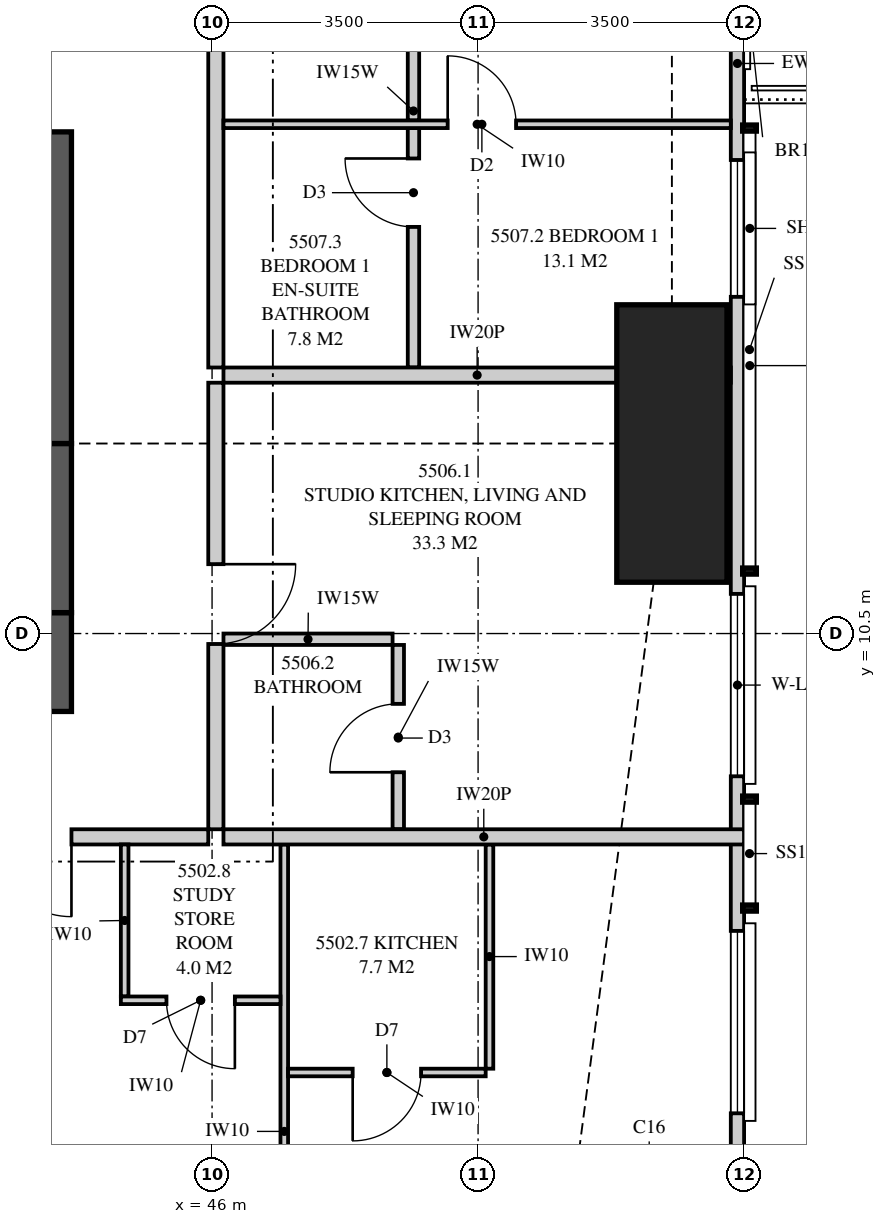
"""IFC4 building model, lengths in metres.
Left out: names, types, materials, properties, quantities, classifications, styles, units other than length and angle.
Written with IfcOpenShell. Run it as: python <this file> out.ifc"""

import sys

from ifc_helpers import new_model, si_unit, direction, frame, frame_2d, origin, origin_2d, place, context, subcontext, project, spatial, polyline, rectangle, outline, extrude, element, fill, save


model = new_model("IFC4")
c1 = context("Model", 3, precision=1e-05, world=origin(), true_north=direction((0.0, 1.0)))
c2 = subcontext(c1, "Body", "Model", "MODEL_VIEW")
j1 = project(units=[si_unit("LENGTHUNIT", "METRE"), si_unit("PLANEANGLEUNIT", "RADIAN")], contexts=[c1])
p1 = place(None, origin())
s1 = spatial("IfcSite", under=j1, at=p1, CompositionType="ELEMENT")
p2 = place(p1, origin())
s2 = spatial("IfcBuilding", under=s1, at=p2, CompositionType="ELEMENT")
p3 = place(p2, frame((0.0, 0.0, 201.25)))
s3 = spatial("IfcBuildingStorey", under=s2, at=p3, CompositionType="ELEMENT", Elevation=201.25)
p4 = place(p3, frame((52.05, 13.0, 0.0), z_axis=(0.0, 0.0, 1.0), x_axis=(1.0, 0.0, 0.0)))
e1 = element("IfcColumn", 1, at=p4, inside=s3, PredefinedType="COLUMN", context=c2, shape_type="SweptSolid", body=[
    extrude(rectangle(XDim=1.45, YDim=3.65, at=origin_2d()), origin(), (0.0, 0.0, 1.0), 3.35),
])
p5 = place(p3, frame((35.9, 10.125, 0.0), z_axis=(0.0, 0.0, 1.0), x_axis=(1.0, 0.0, 0.0)))
e2 = element("IfcWall", 2, at=p5, inside=s3, PredefinedType="SHEAR", context=c2, shape_type="SweptSolid", body=[
    extrude(rectangle(XDim=8.25, YDim=1.3, at=frame_2d((4.125, 0.0))), origin(), (0.0, 0.0, 1.0), 3.35),
])
p6 = place(p5, frame((2.7, 0.0, 0.0)))
e3 = element("IfcOpeningElement", 3, at=p6, cuts=e2, PredefinedType="OPENING", context=c2, shape_type="SweptSolid", body=[
    extrude(rectangle(XDim=1.0, YDim=2.1, at=frame_2d((0.5, 1.05))), frame((0.0, 0.66, 0.0), z_axis=(0.0, -1.0, 0.0), x_axis=(1.0, 0.0, 0.0)), (0.0, 0.0, 1.0), 1.32),
])
p7 = place(p3, frame((43.8, 10.775, 0.0), z_axis=(0.0, 0.0, 1.0), x_axis=(0.0, 1.0, 0.0)))
e4 = element("IfcWall", 4, at=p7, inside=s3, PredefinedType="SHEAR", context=c2, shape_type="SweptSolid", body=[
    extrude(rectangle(XDim=2.225, YDim=0.7, at=frame_2d((1.113, 0.0))), origin(), (0.0, 0.0, 1.0), 3.35),
])
p8 = place(p3, frame((43.8, 13.0, 0.0), z_axis=(0.0, 0.0, 1.0), x_axis=(0.0, 1.0, 0.0)))
e5 = element("IfcWall", 5, at=p8, inside=s3, PredefinedType="SHEAR", context=c2, shape_type="SweptSolid", body=[
    extrude(rectangle(XDim=6.3, YDim=0.7, at=frame_2d((3.15, 0.0))), origin(), (0.0, 0.0, 1.0), 3.35),
])
p9 = place(p8, frame((4.1, 0.0, 0.0)))
e6 = element("IfcOpeningElement", 6, at=p9, cuts=e5, PredefinedType="OPENING", context=c2, shape_type="SweptSolid", body=[
    extrude(rectangle(XDim=1.2, YDim=2.2, at=frame_2d((0.6, 1.1))), frame((0.0, 0.36, 0.0), z_axis=(0.0, -1.0, 0.0), x_axis=(1.0, 0.0, 0.0)), (0.0, 0.0, 1.0), 0.72),
])
p10 = place(p3, frame((52.913, 3.051, 0.0), z_axis=(0.0, 0.0, 1.0), x_axis=(0.0, 1.0, 0.0)))
e7 = element("IfcWall", 7, at=p10, inside=s3, PredefinedType="SOLIDWALL", context=c2, shape_type="SweptSolid", body=[
    extrude(outline(polyline([(0.0, 0.0), (29.897, 0.0), (29.897, 3.11), (22.167, 3.11), (22.167, 2.15), (22.074, 2.15), (22.074, 3.11), (21.949, 3.11), (21.949, 2.15), (9.949, 2.15), (9.949, 3.11), (9.847, 3.11), (9.847, 2.15), (9.706, 2.15), (9.706, 3.11), (0.0, 3.11), (0.0, 0.0)])), frame((0.0, 0.087, 0.0), z_axis=(0.0, -1.0, 0.0), x_axis=(1.0, 0.0, 0.0)), (0.0, 0.0, 1.0), 0.175),
])
p11 = place(p10, frame((1.137, 0.0, 0.4)))
e8 = element("IfcOpeningElement", 8, at=p11, cuts=e7, PredefinedType="OPENING", context=c2, shape_type="SweptSolid", body=[
    extrude(rectangle(XDim=2.4, YDim=1.7, at=frame_2d((1.2, 0.85))), frame((0.0, 0.097, 0.0), z_axis=(0.0, -1.0, 0.0), x_axis=(1.0, 0.0, 0.0)), (0.0, 0.0, 1.0), 0.195),
])
p12 = place(p10, frame((5.571, 0.0, 0.4)))
e9 = element("IfcOpeningElement", 9, at=p12, cuts=e7, PredefinedType="OPENING", context=c2, shape_type="SweptSolid", body=[
    extrude(rectangle(XDim=2.4, YDim=1.7, at=frame_2d((1.2, 0.85))), frame((0.0, 0.097, 0.0), z_axis=(0.0, -1.0, 0.0), x_axis=(1.0, 0.0, 0.0)), (0.0, 0.0, 1.0), 0.195),
])
p13 = place(p10, frame((11.879, 0.0, 0.4)))
e10 = element("IfcOpeningElement", 10, at=p13, cuts=e7, PredefinedType="OPENING", context=c2, shape_type="SweptSolid", body=[
    extrude(rectangle(XDim=1.8, YDim=1.7, at=frame_2d((0.9, 0.85))), frame((0.0, 0.097, 0.0), z_axis=(0.0, -1.0, 0.0), x_axis=(1.0, 0.0, 0.0)), (0.0, 0.0, 1.0), 0.195),
])
p14 = place(p10, frame((15.324, 0.0, 0.0)))
e11 = element("IfcOpeningElement", 11, at=p14, cuts=e7, PredefinedType="OPENING", context=c2, shape_type="SweptSolid", body=[
    extrude(rectangle(XDim=1.8, YDim=2.1, at=frame_2d((0.9, 1.05))), frame((0.0, 0.097, 0.0), z_axis=(0.0, -1.0, 0.0), x_axis=(1.0, 0.0, 0.0)), (0.0, 0.0, 1.0), 0.195),
])
p15 = place(p10, frame((18.224, 0.0, 0.4)))
e12 = element("IfcOpeningElement", 12, at=p15, cuts=e7, PredefinedType="OPENING", context=c2, shape_type="SweptSolid", body=[
    extrude(rectangle(XDim=1.8, YDim=1.7, at=frame_2d((0.9, 0.85))), frame((0.0, 0.097, 0.0), z_axis=(0.0, -1.0, 0.0), x_axis=(1.0, 0.0, 0.0)), (0.0, 0.0, 1.0), 0.195),
])
p16 = place(p10, frame((27.461, 0.0, 0.4)))
e13 = element("IfcOpeningElement", 13, at=p16, cuts=e7, PredefinedType="OPENING", context=c2, shape_type="SweptSolid", body=[
    extrude(rectangle(XDim=1.2, YDim=1.7, at=frame_2d((0.6, 0.85))), frame((0.0, 0.097, 0.0), z_axis=(0.0, -1.0, 0.0), x_axis=(1.0, 0.0, 0.0)), (0.0, 0.0, 1.0), 0.195),
])
p17 = place(p3, frame((34.3, 7.825, 0.0), z_axis=(0.0, 0.0, 1.0), x_axis=(1.0, 0.0, 0.0)))
e14 = element("IfcWall", 14, at=p17, inside=s3, PredefinedType="PARTITIONING", context=c2, shape_type="SweptSolid", body=[
    extrude(outline(polyline([(0.0, 0.0), (11.65, 0.0), (11.65, 3.11), (8.787, 3.11), (8.787, 2.541), (8.113, 2.541), (8.113, 3.11), (0.0, 3.11), (0.0, 0.0)])), frame((0.0, 0.1, 0.0), z_axis=(0.0, -1.0, 0.0), x_axis=(1.0, 0.0, 0.0)), (0.0, 0.0, 1.0), 0.2),
])
p18 = place(p17, frame((8.8, 0.0, 0.0)))
e15 = element("IfcOpeningElement", 15, at=p18, cuts=e14, PredefinedType="OPENING", context=c2, shape_type="SweptSolid", body=[
    extrude(rectangle(XDim=1.05, YDim=2.2, at=frame_2d((0.525, 1.1))), frame((0.0, 0.11, 0.0), z_axis=(0.0, -1.0, 0.0), x_axis=(1.0, 0.0, 0.0)), (0.0, 0.0, 1.0), 0.22),
])
p19 = place(p3, frame((46.95, 0.175, 0.0), z_axis=(0.0, 0.0, 1.0), x_axis=(0.0, 1.0, 0.0)))
e16 = element("IfcWall", 16, at=p19, inside=s3, PredefinedType="PARTITIONING", context=c2, shape_type="SweptSolid", body=[
    extrude(outline(polyline([(0.0, 0.0), (7.55, 0.0), (7.55, 3.11), (2.392, 3.11), (2.392, 2.15), (0.645, 2.15), (0.645, 3.11), (0.0, 3.11), (0.0, 0.0)])), frame((0.0, 0.05, 0.0), z_axis=(0.0, -1.0, 0.0), x_axis=(1.0, 0.0, 0.0)), (0.0, 0.0, 1.0), 0.1),
])
p20 = place(p19, frame((1.8, 0.0, 0.0)))
e17 = element("IfcOpeningElement", 17, at=p20, cuts=e16, PredefinedType="OPENING", context=c2, shape_type="SweptSolid", body=[
    extrude(rectangle(XDim=0.9, YDim=2.1, at=frame_2d((0.45, 1.05))), frame((0.0, 0.06, 0.0), z_axis=(0.0, -1.0, 0.0), x_axis=(1.0, 0.0, 0.0)), (0.0, 0.0, 1.0), 0.12),
])
p21 = place(p3, frame((47.0, 4.725, 0.0), z_axis=(0.0, 0.0, 1.0), x_axis=(1.0, 0.0, 0.0)))
e18 = element("IfcWall", 18, at=p21, inside=s3, PredefinedType="PARTITIONING", context=c2, shape_type="SweptSolid", body=[
    extrude(rectangle(XDim=2.6, YDim=0.1, at=frame_2d((1.3, 0.0))), origin(), (0.0, 0.0, 1.0), 3.11),
])
p22 = place(p21, frame((0.85, 0.0, 0.0)))
e19 = element("IfcOpeningElement", 19, at=p22, cuts=e18, PredefinedType="OPENING", context=c2, shape_type="SweptSolid", body=[
    extrude(rectangle(XDim=0.9, YDim=2.1, at=frame_2d((0.45, 1.05))), frame((0.0, 0.06, 0.0), z_axis=(0.0, -1.0, 0.0), x_axis=(1.0, 0.0, 0.0)), (0.0, 0.0, 1.0), 0.12),
])
p23 = place(p3, frame((49.65, 4.775, 0.0), z_axis=(0.0, 0.0, 1.0), x_axis=(0.0, 1.0, 0.0)))
e20 = element("IfcWall", 20, at=p23, inside=s3, PredefinedType="PARTITIONING", context=c2, shape_type="SweptSolid", body=[
    extrude(rectangle(XDim=2.95, YDim=0.1, at=frame_2d((1.475, 0.0))), origin(), (0.0, 0.0, 1.0), 3.11),
])
p24 = place(p3, frame((46.15, 7.825, 0.0), z_axis=(0.0, 0.0, 1.0), x_axis=(1.0, 0.0, 0.0)))
e21 = element("IfcWall", 21, at=p24, inside=s3, PredefinedType="PARTITIONING", context=c2, shape_type="SweptSolid", body=[
    extrude(outline(polyline([(0.0, 0.0), (6.85, 0.0), (6.85, 3.11), (6.138, 3.11), (6.138, 2.15), (4.303, 2.15), (4.303, 3.11), (0.0, 3.11), (0.0, 0.0)])), frame((0.0, 0.1, 0.0), z_axis=(0.0, -1.0, 0.0), x_axis=(1.0, 0.0, 0.0)), (0.0, 0.0, 1.0), 0.2),
])
p25 = place(p3, frame((52.825, 13.9, 0.0), z_axis=(0.0, 0.0, 1.0), x_axis=(-1.0, 0.0, 0.0)))
e22 = element("IfcWall", 22, at=p25, inside=s3, PredefinedType="PARTITIONING", context=c2, shape_type="SweptSolid", body=[
    extrude(outline(polyline([(0.529, 2.15), (0.0, 2.15), (0.0, 0.0), (0.529, 0.0), (0.529, 0.636), (1.021, 0.636), (1.021, 0.0), (6.675, 0.0), (6.675, 3.11), (1.685, 3.11), (1.685, 2.15), (1.021, 2.15), (1.021, 1.514), (0.529, 1.514), (0.529, 2.15)])), frame((0.0, 0.1, 0.0), z_axis=(0.0, -1.0, 0.0), x_axis=(1.0, 0.0, 0.0)), (0.0, 0.0, 1.0), 0.2),
])
p26 = place(p3, frame((46.05, 7.925, 0.0), z_axis=(0.0, 0.0, 1.0), x_axis=(0.0, 1.0, 0.0)))
e23 = element("IfcWall", 23, at=p26, inside=s3, PredefinedType="PARTITIONING", context=c2, shape_type="SweptSolid", body=[
    extrude(outline(polyline([(0.0, 0.0), (5.875, 0.0), (5.875, 3.11), (5.412, 3.11), (5.412, 2.541), (4.738, 2.541), (4.738, 3.11), (0.0, 3.11), (0.0, 0.0)])), frame((0.0, 0.1, 0.0), z_axis=(0.0, -1.0, 0.0), x_axis=(1.0, 0.0, 0.0)), (0.0, 0.0, 1.0), 0.2),
])
p27 = place(p26, frame((2.438, 0.0, 0.0)))
e24 = element("IfcOpeningElement", 24, at=p27, cuts=e23, PredefinedType="OPENING", context=c2, shape_type="SweptSolid", body=[
    extrude(rectangle(XDim=1.05, YDim=2.2, at=frame_2d((0.525, 1.1))), frame((0.0, 0.11, 0.0), z_axis=(0.0, -1.0, 0.0), x_axis=(1.0, 0.0, 0.0)), (0.0, 0.0, 1.0), 0.22),
])
p28 = place(p3, frame((48.45, 7.925, 0.0), z_axis=(0.0, 0.0, 1.0), x_axis=(0.0, 1.0, 0.0)))
e25 = element("IfcWall", 25, at=p28, inside=s3, PredefinedType="PLUMBINGWALL", context=c2, shape_type="SweptSolid", body=[
    extrude(rectangle(XDim=2.425, YDim=0.15, at=frame_2d((1.212, 0.0))), origin(), (0.0, 0.0, 1.0), 3.11),
])
p29 = place(p28, frame((0.75, 0.0, 0.0)))
e26 = element("IfcOpeningElement", 26, at=p29, cuts=e25, PredefinedType="OPENING", context=c2, shape_type="SweptSolid", body=[
    extrude(rectangle(XDim=0.9, YDim=2.1, at=frame_2d((0.45, 1.05))), frame((0.0, 0.085, 0.0), z_axis=(0.0, -1.0, 0.0), x_axis=(1.0, 0.0, 0.0)), (0.0, 0.0, 1.0), 0.17),
])
p30 = place(p3, frame((48.375, 10.425, 0.0), z_axis=(0.0, 0.0, 1.0), x_axis=(-1.0, 0.0, 0.0)))
e27 = element("IfcWall", 27, at=p30, inside=s3, PredefinedType="PLUMBINGWALL", context=c2, shape_type="SweptSolid", body=[
    extrude(rectangle(XDim=2.225, YDim=0.15, at=frame_2d((1.113, 0.0))), origin(), (0.0, 0.0, 1.0), 3.11),
])
p31 = place(p3, frame((46.05, 14.0, 0.0), z_axis=(0.0, 0.0, 1.0), x_axis=(0.0, 1.0, 0.0)))
e28 = element("IfcWall", 28, at=p31, inside=s3, PredefinedType="PARTITIONING", context=c2, shape_type="SweptSolid", body=[
    extrude(rectangle(XDim=6.9, YDim=0.2, at=frame_2d((3.45, 0.0))), origin(), (0.0, 0.0, 1.0), 3.11),
])
p32 = place(p3, frame((52.825, 17.2, 0.0), z_axis=(0.0, 0.0, 1.0), x_axis=(-1.0, 0.0, 0.0)))
e29 = element("IfcWall", 29, at=p32, inside=s3, PredefinedType="PARTITIONING", context=c2, shape_type="SweptSolid", body=[
    extrude(outline(polyline([(0.0, 0.0), (6.675, 0.0), (6.675, 3.11), (1.635, 3.11), (1.635, 2.15), (0.0, 2.15), (0.0, 3.11), (0.0, 0.0)])), frame((0.0, 0.05, 0.0), z_axis=(0.0, -1.0, 0.0), x_axis=(1.0, 0.0, 0.0)), (0.0, 0.0, 1.0), 0.1),
])
p33 = place(p32, frame((2.825, 0.0, 0.0)))
e30 = element("IfcOpeningElement", 30, at=p33, cuts=e29, PredefinedType="OPENING", context=c2, shape_type="SweptSolid", body=[
    extrude(rectangle(XDim=0.9, YDim=2.1, at=frame_2d((0.45, 1.05))), frame((0.0, 0.06, 0.0), z_axis=(0.0, -1.0, 0.0), x_axis=(1.0, 0.0, 0.0)), (0.0, 0.0, 1.0), 0.12),
])
p34 = place(p3, frame((48.65, 14.0, 0.0), z_axis=(0.0, 0.0, 1.0), x_axis=(0.0, 1.0, 0.0)))
e31 = element("IfcWall", 31, at=p34, inside=s3, PredefinedType="PLUMBINGWALL", context=c2, shape_type="SweptSolid", body=[
    extrude(rectangle(XDim=3.15, YDim=0.15, at=frame_2d((1.575, 0.0))), origin(), (0.0, 0.0, 1.0), 3.11),
])
p35 = place(p34, frame((1.85, 0.0, 0.0)))
e32 = element("IfcOpeningElement", 32, at=p35, cuts=e31, PredefinedType="OPENING", context=c2, shape_type="SweptSolid", body=[
    extrude(rectangle(XDim=0.9, YDim=2.1, at=frame_2d((0.45, 1.05))), frame((0.0, 0.085, 0.0), z_axis=(0.0, -1.0, 0.0), x_axis=(1.0, 0.0, 0.0)), (0.0, 0.0, 1.0), 0.17),
])
p36 = place(p3, frame((48.65, 17.25, 0.0), z_axis=(0.0, 0.0, 1.0), x_axis=(0.0, 1.0, 0.0)))
e33 = element("IfcWall", 33, at=p36, inside=s3, PredefinedType="PLUMBINGWALL", context=c2, shape_type="SweptSolid", body=[
    extrude(rectangle(XDim=3.5, YDim=0.15, at=frame_2d((1.75, 0.0))), origin(), (0.0, 0.0, 1.0), 3.11),
])
p37 = place(p3, frame((46.9, 5.675, 0.0), z_axis=(0.0, 0.0, 1.0), x_axis=(-1.0, 0.0, 0.0)))
e34 = element("IfcWall", 34, at=p37, inside=s3, PredefinedType="PARTITIONING", context=c2, shape_type="SweptSolid", body=[
    extrude(rectangle(XDim=2.1, YDim=0.1, at=frame_2d((1.05, 0.0))), origin(), (0.0, 0.0, 1.0), 3.11),
])
p38 = place(p37, frame((0.6, 0.0, 0.0)))
e35 = element("IfcOpeningElement", 35, at=p38, cuts=e34, PredefinedType="OPENING", context=c2, shape_type="SweptSolid", body=[
    extrude(rectangle(XDim=0.9, YDim=2.1, at=frame_2d((0.45, 1.05))), frame((0.0, 0.06, 0.0), z_axis=(0.0, -1.0, 0.0), x_axis=(1.0, 0.0, 0.0)), (0.0, 0.0, 1.0), 0.12),
])
p39 = place(p3, frame((44.85, 7.725, 0.0), z_axis=(0.0, 0.0, 1.0), x_axis=(0.0, -1.0, 0.0)))
e36 = element("IfcWall", 36, at=p39, inside=s3, PredefinedType="PARTITIONING", context=c2, shape_type="SweptSolid", body=[
    extrude(rectangle(XDim=2.0, YDim=0.1, at=frame_2d((1.0, 0.0))), origin(), (0.0, 0.0, 1.0), 3.11),
])
p40 = place(p11, origin())
e37 = element("IfcWindow", 37, at=p40, inside=s3, PartitioningType="SINGLE_PANEL", PredefinedType="WINDOW", context=c2, shape_type="SweptSolid", body=[
    extrude(rectangle(XDim=2.4, YDim=1.7, at=frame_2d((1.2, 0.85))), frame((0.0, 0.03, 0.0), z_axis=(0.0, -1.0, 0.0), x_axis=(1.0, 0.0, 0.0)), (0.0, 0.0, 1.0), 0.06),
])
fill(e8, e37)
p41 = place(p12, origin())
e38 = element("IfcWindow", 38, at=p41, inside=s3, PartitioningType="SINGLE_PANEL", PredefinedType="WINDOW", context=c2, shape_type="SweptSolid", body=[
    extrude(rectangle(XDim=2.4, YDim=1.7, at=frame_2d((1.2, 0.85))), frame((0.0, 0.03, 0.0), z_axis=(0.0, -1.0, 0.0), x_axis=(1.0, 0.0, 0.0)), (0.0, 0.0, 1.0), 0.06),
])
fill(e9, e38)
p42 = place(p13, origin())
e39 = element("IfcWindow", 39, at=p42, inside=s3, PartitioningType="SINGLE_PANEL", PredefinedType="WINDOW", context=c2, shape_type="SweptSolid", body=[
    extrude(rectangle(XDim=1.8, YDim=1.7, at=frame_2d((0.9, 0.85))), frame((0.0, 0.03, 0.0), z_axis=(0.0, -1.0, 0.0), x_axis=(1.0, 0.0, 0.0)), (0.0, 0.0, 1.0), 0.06),
])
fill(e10, e39)
p43 = place(p18, frame((1.05, 0.0, 0.0), z_axis=(0.0, 0.0, 1.0), x_axis=(-1.0, 0.0, 0.0)))
e40 = element("IfcDoor", 40, at=p43, inside=s3, OperationType="SINGLE_SWING_LEFT", PredefinedType="DOOR", context=c2, shape_type="SweptSolid", body=[
    extrude(rectangle(XDim=1.05, YDim=2.2, at=frame_2d((0.525, 1.1))), frame((0.0, 0.025, 0.0), z_axis=(0.0, -1.0, 0.0), x_axis=(1.0, 0.0, 0.0)), (0.0, 0.0, 1.0), 0.05),
])
fill(e15, e40)
p44 = place(p22, frame((0.9, 0.0, 0.0), z_axis=(0.0, 0.0, 1.0), x_axis=(-1.0, 0.0, 0.0)))
e41 = element("IfcDoor", 41, at=p44, inside=s3, OperationType="SINGLE_SWING_RIGHT", PredefinedType="DOOR", context=c2, shape_type="SweptSolid", body=[
    extrude(rectangle(XDim=0.9, YDim=2.1, at=frame_2d((0.45, 1.05))), frame((0.0, 0.025, 0.0), z_axis=(0.0, -1.0, 0.0), x_axis=(1.0, 0.0, 0.0)), (0.0, 0.0, 1.0), 0.05),
])
fill(e19, e41)
p45 = place(p27, frame((1.05, 0.0, 0.0), z_axis=(0.0, 0.0, 1.0), x_axis=(-1.0, 0.0, 0.0)))
e42 = element("IfcDoor", 42, at=p45, inside=s3, OperationType="SINGLE_SWING_LEFT", PredefinedType="DOOR", context=c2, shape_type="SweptSolid", body=[
    extrude(rectangle(XDim=1.05, YDim=2.2, at=frame_2d((0.525, 1.1))), frame((0.0, 0.025, 0.0), z_axis=(0.0, -1.0, 0.0), x_axis=(1.0, 0.0, 0.0)), (0.0, 0.0, 1.0), 0.05),
])
fill(e24, e42)
p46 = place(p29, origin())
e43 = element("IfcDoor", 43, at=p46, inside=s3, OperationType="SINGLE_SWING_LEFT", PredefinedType="DOOR", context=c2, shape_type="SweptSolid", body=[
    extrude(rectangle(XDim=0.9, YDim=2.1, at=frame_2d((0.45, 1.05))), frame((0.0, 0.025, 0.0), z_axis=(0.0, -1.0, 0.0), x_axis=(1.0, 0.0, 0.0)), (0.0, 0.0, 1.0), 0.05),
])
fill(e26, e43)
p47 = place(p33, frame((0.9, 0.0, 0.0), z_axis=(0.0, 0.0, 1.0), x_axis=(-1.0, 0.0, 0.0)))
e44 = element("IfcDoor", 44, at=p47, inside=s3, OperationType="SINGLE_SWING_LEFT", PredefinedType="DOOR", context=c2, shape_type="SweptSolid", body=[
    extrude(rectangle(XDim=0.9, YDim=2.1, at=frame_2d((0.45, 1.05))), frame((0.0, 0.025, 0.0), z_axis=(0.0, -1.0, 0.0), x_axis=(1.0, 0.0, 0.0)), (0.0, 0.0, 1.0), 0.05),
])
fill(e30, e44)
p48 = place(p35, origin())
e45 = element("IfcDoor", 45, at=p48, inside=s3, OperationType="SINGLE_SWING_RIGHT", PredefinedType="DOOR", context=c2, shape_type="SweptSolid", body=[
    extrude(rectangle(XDim=0.9, YDim=2.1, at=frame_2d((0.45, 1.05))), frame((0.0, 0.025, 0.0), z_axis=(0.0, -1.0, 0.0), x_axis=(1.0, 0.0, 0.0)), (0.0, 0.0, 1.0), 0.05),
])
fill(e32, e45)
p49 = place(p38, origin())
e46 = element("IfcDoor", 46, at=p49, inside=s3, OperationType="SINGLE_SWING_LEFT", PredefinedType="DOOR", context=c2, shape_type="SweptSolid", body=[
    extrude(rectangle(XDim=0.9, YDim=2.1, at=frame_2d((0.45, 1.05))), frame((0.0, 0.025, 0.0), z_axis=(0.0, -1.0, 0.0), x_axis=(1.0, 0.0, 0.0)), (0.0, 0.0, 1.0), 0.05),
])
fill(e35, e46)
save(model, sys.argv[1])
